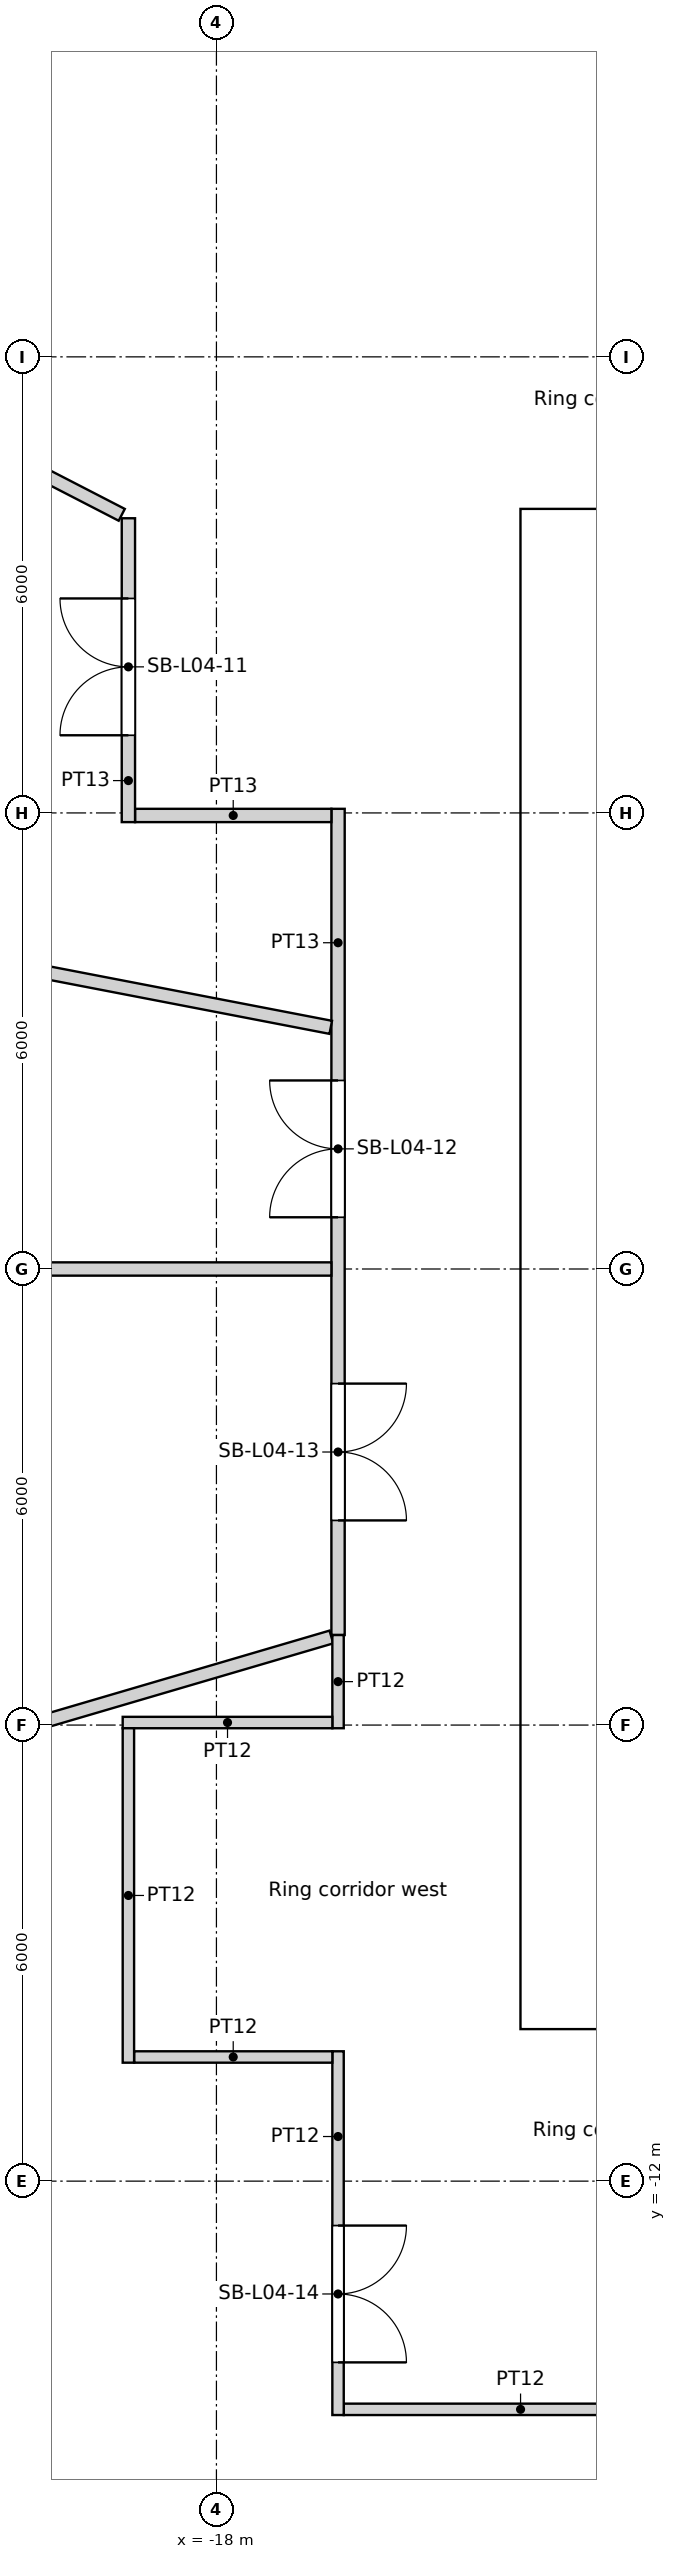
"""IFC4 building model, lengths in metres.
Left out: names, types, materials, properties, quantities, classifications, styles, units other than length and angle.
Written with IfcOpenShell. Run it as: python <this file> out.ifc"""

import sys

from ifc_helpers import new_model, si_unit, direction, frame, frame_2d, origin, origin_2d, place, context, subcontext, project, spatial, rectangle, circle, extrude, element, fill, save


model = new_model("IFC4")
c1 = context("Model", 3, precision=1e-05, world=origin(), true_north=direction((0.0, 1.0)))
c2 = subcontext(c1, "Body", "Model", "MODEL_VIEW")
j1 = project(units=[si_unit("LENGTHUNIT", "METRE"), si_unit("PLANEANGLEUNIT", "RADIAN")], contexts=[c1])
p1 = place(None, origin())
s1 = spatial("IfcSite", under=j1, at=p1, CompositionType="ELEMENT")
p2 = place(p1, origin())
s2 = spatial("IfcBuilding", under=s1, at=p2, CompositionType="ELEMENT")
p3 = place(p2, frame((0.0, 0.0, 23.4)))
s3 = spatial("IfcBuildingStorey", under=s2, at=p3, CompositionType="ELEMENT", Elevation=23.4)
for number, where, z_axis, x_axis in (
    (1, (-20.509, 13.489, 0.0), (0.0, 0.0, 1.0), (1.0, 0.0, 0.0)),
    (2, (-20.509, -13.489, 0.0), (0.0, 0.0, 1.0), (1.0, 0.0, 0.0)),
):
    element("IfcColumn", number, at=place(p3, frame(where, z_axis=z_axis, x_axis=x_axis)), inside=s3, PredefinedType="COLUMN", context=c2, shape_type="SweptSolid", body=[
        extrude(circle(Radius=0.75, at=origin_2d()), origin(), (0.0, 0.0, 1.0), 4.8),
    ])
for number, where, z_axis, x_axis in (
    (3, (-13.798, 12.802, 0.0), (0.0, 0.0, 1.0), (1.0, 0.0, 0.0)),
    (4, (-16.958, 8.167, 0.0), (0.0, 0.0, 1.0), (1.0, 0.0, 0.0)),
    (5, (-18.612, 2.805, 0.0), (0.0, 0.0, 1.0), (1.0, 0.0, 0.0)),
    (6, (-18.612, -2.805, 0.0), (0.0, 0.0, 1.0), (1.0, 0.0, 0.0)),
    (7, (-16.958, -8.167, 0.0), (0.0, 0.0, 1.0), (1.0, 0.0, 0.0)),
    (8, (-13.798, -12.802, 0.0), (0.0, 0.0, 1.0), (1.0, 0.0, 0.0)),
):
    element("IfcColumn", number, at=place(p3, frame(where, z_axis=z_axis, x_axis=x_axis)), inside=s3, PredefinedType="COLUMN", context=c2, shape_type="SweptSolid", body=[
        extrude(circle(Radius=0.8, at=origin_2d()), origin(), (0.0, 0.0, 1.0), 4.8),
    ])
p4 = place(p3, frame((-14.0, -9.4, 0.0), z_axis=(0.0, 0.0, 1.0), x_axis=(1.0, 0.0, 0.0)))
e9 = element("IfcWall", 9, at=p4, inside=s3, PredefinedType="SOLIDWALL", context=c2, shape_type="SweptSolid", body=[
    extrude(rectangle(XDim=28.0, YDim=1.2, at=frame_2d((14.0, 0.0))), origin(), (0.0, 0.0, 1.0), 4.8),
])
p5 = place(p4, frame((14.9, 0.0, 0.0)))
e10 = element("IfcOpeningElement", 10, at=p5, cuts=e9, PredefinedType="OPENING", context=c2, shape_type="SweptSolid", body=[
    extrude(rectangle(XDim=1.0, YDim=2.1, at=frame_2d((0.5, 1.05))), frame((0.0, 0.6, 0.0), z_axis=(0.0, -1.0, 0.0), x_axis=(1.0, 0.0, 0.0)), (0.0, 0.0, 1.0), 1.2),
])
p6 = place(p4, frame((9.8, 0.0, 0.0)))
e11 = element("IfcOpeningElement", 11, at=p6, cuts=e9, PredefinedType="OPENING", context=c2, shape_type="SweptSolid", body=[
    extrude(rectangle(XDim=1.8, YDim=2.1, at=frame_2d((0.9, 1.05))), frame((0.0, 0.6, 0.0), z_axis=(0.0, -1.0, 0.0), x_axis=(1.0, 0.0, 0.0)), (0.0, 0.0, 1.0), 1.2),
])
p7 = place(p4, frame((16.4, 0.0, 0.0)))
e12 = element("IfcOpeningElement", 12, at=p7, cuts=e9, PredefinedType="OPENING", context=c2, shape_type="SweptSolid", body=[
    extrude(rectangle(XDim=1.8, YDim=2.1, at=frame_2d((0.9, 1.05))), frame((0.0, 0.6, 0.0), z_axis=(0.0, -1.0, 0.0), x_axis=(1.0, 0.0, 0.0)), (0.0, 0.0, 1.0), 1.2),
])
p8 = place(p3, frame((-14.0, 9.4, 0.0), z_axis=(0.0, 0.0, 1.0), x_axis=(1.0, 0.0, 0.0)))
e13 = element("IfcWall", 13, at=p8, inside=s3, PredefinedType="SOLIDWALL", context=c2, shape_type="SweptSolid", body=[
    extrude(rectangle(XDim=28.0, YDim=1.2, at=frame_2d((14.0, 0.0))), origin(), (0.0, 0.0, 1.0), 4.8),
])
p9 = place(p8, frame((9.8, 0.0, 0.0)))
e14 = element("IfcOpeningElement", 14, at=p9, cuts=e13, PredefinedType="OPENING", context=c2, shape_type="SweptSolid", body=[
    extrude(rectangle(XDim=1.8, YDim=2.1, at=frame_2d((0.9, 1.05))), frame((0.0, 0.6, 0.0), z_axis=(0.0, -1.0, 0.0), x_axis=(1.0, 0.0, 0.0)), (0.0, 0.0, 1.0), 1.2),
])
p10 = place(p3, frame((-13.4, -8.8, 0.0), z_axis=(0.0, 0.0, 1.0), x_axis=(0.0, 1.0, 0.0)))
e15 = element("IfcWall", 15, at=p10, inside=s3, PredefinedType="SOLIDWALL", context=c2, shape_type="SweptSolid", body=[
    extrude(rectangle(XDim=17.6, YDim=1.2, at=frame_2d((8.8, 0.0))), origin(), (0.0, 0.0, 1.0), 4.8),
])
p11 = place(p10, frame((5.2, 0.0, 0.0)))
e16 = element("IfcOpeningElement", 16, at=p11, cuts=e15, PredefinedType="OPENING", context=c2, shape_type="SweptSolid", body=[
    extrude(rectangle(XDim=1.0, YDim=2.1, at=frame_2d((0.5, 1.05))), frame((0.0, 0.6, 0.0), z_axis=(0.0, -1.0, 0.0), x_axis=(1.0, 0.0, 0.0)), (0.0, 0.0, 1.0), 1.2),
])
p12 = place(p10, frame((11.4, 0.0, 0.0)))
e17 = element("IfcOpeningElement", 17, at=p12, cuts=e15, PredefinedType="OPENING", context=c2, shape_type="SweptSolid", body=[
    extrude(rectangle(XDim=1.0, YDim=2.1, at=frame_2d((0.5, 1.05))), frame((0.0, 0.6, 0.0), z_axis=(0.0, -1.0, 0.0), x_axis=(1.0, 0.0, 0.0)), (0.0, 0.0, 1.0), 1.2),
])
p13 = place(p3, frame((-31.224, 0.0, 0.0), z_axis=(0.0, 0.0, 1.0), x_axis=(1.0, 0.0, 0.0)))
e18 = element("IfcWall", 18, at=p13, inside=s3, PredefinedType="PARTITIONING", context=c2, shape_type="SweptSolid", body=[
    extrude(rectangle(XDim=14.737, YDim=0.175, at=frame_2d((7.368, 0.0))), origin(), (0.0, 0.0, 1.0), 3.75),
])
p14 = place(p3, frame((-30.66, 5.909, 0.0), z_axis=(0.0, 0.0, 1.0), x_axis=(0.981927651436, -0.189256670545, 0.0)))
e19 = element("IfcWall", 19, at=p14, inside=s3, PredefinedType="PARTITIONING", context=c2, shape_type="SweptSolid", body=[
    extrude(rectangle(XDim=14.425, YDim=0.175, at=frame_2d((7.212, 0.0))), origin(), (0.0, 0.0, 1.0), 3.75),
])
p15 = place(p3, frame((-29.959, -8.797, 0.0), z_axis=(0.0, 0.0, 1.0), x_axis=(0.959495810273, 0.281722895889, 0.0)))
e20 = element("IfcWall", 20, at=p15, inside=s3, PredefinedType="PARTITIONING", context=c2, shape_type="SweptSolid", body=[
    extrude(rectangle(XDim=14.041, YDim=0.175, at=frame_2d((7.02, 0.0))), origin(), (0.0, 0.0, 1.0), 3.75),
])
p16 = place(p3, frame((-27.753, 14.308, 0.0), z_axis=(0.0, 0.0, 1.0), x_axis=(0.888834171956, -0.458228998169, 0.0)))
e21 = element("IfcWall", 21, at=p16, inside=s3, PredefinedType="PARTITIONING", context=c2, shape_type="SweptSolid", body=[
    extrude(rectangle(XDim=9.572, YDim=0.175, at=frame_2d((4.786, 0.0))), origin(), (0.0, 0.0, 1.0), 3.75),
])
p17 = place(p3, frame((-19.083, -10.367, 0.0), z_axis=(0.0, 0.0, 1.0), x_axis=(1.0, 0.0, 0.0)))
e22 = element("IfcWall", 22, at=p17, inside=s3, PredefinedType="PARTITIONING", context=c2, shape_type="SweptSolid", body=[
    extrude(rectangle(XDim=2.608, YDim=0.15, at=frame_2d((1.304, 0.0))), origin(), (0.0, 0.0, 1.0), 3.75),
])
p18 = place(p3, frame((-19.158, -6.042, 0.0), z_axis=(0.0, 0.0, 1.0), x_axis=(0.0, -1.0, 0.0)))
e23 = element("IfcWall", 23, at=p18, inside=s3, PredefinedType="PARTITIONING", context=c2, shape_type="SweptSolid", body=[
    extrude(rectangle(XDim=4.4, YDim=0.15, at=frame_2d((2.2, 0.0))), origin(), (0.0, 0.0, 1.0), 3.75),
])
p19 = place(p3, frame((-19.071, 5.967, 0.0), z_axis=(0.0, 0.0, 1.0), x_axis=(1.0, 0.0, 0.0)))
e24 = element("IfcWall", 24, at=p19, inside=s3, PredefinedType="PARTITIONING", context=c2, shape_type="SweptSolid", body=[
    extrude(rectangle(XDim=2.583, YDim=0.175, at=frame_2d((1.292, 0.0))), origin(), (0.0, 0.0, 1.0), 3.75),
])
p20 = place(p3, frame((-19.158, 5.879, 0.0), z_axis=(0.0, 0.0, 1.0), x_axis=(0.0, 1.0, 0.0)))
e25 = element("IfcWall", 25, at=p20, inside=s3, PredefinedType="PARTITIONING", context=c2, shape_type="SweptSolid", body=[
    extrude(rectangle(XDim=3.998, YDim=0.175, at=frame_2d((1.999, 0.0))), origin(), (0.0, 0.0, 1.0), 3.75),
])
p21 = place(p20, frame((1.143, 0.0, 0.0)))
e26 = element("IfcOpeningElement", 26, at=p21, cuts=e25, PredefinedType="OPENING", context=c2, shape_type="SweptSolid", body=[
    extrude(rectangle(XDim=1.8, YDim=2.4, at=frame_2d((0.9, 1.2))), frame((0.0, 0.087, 0.0), z_axis=(0.0, -1.0, 0.0), x_axis=(1.0, 0.0, 0.0)), (0.0, 0.0, 1.0), 0.175),
])
p22 = place(p3, frame((-16.325, -15.002, 0.0), z_axis=(0.0, 0.0, 1.0), x_axis=(1.0, 0.0, 0.0)))
e27 = element("IfcWall", 27, at=p22, inside=s3, PredefinedType="PARTITIONING", context=c2, shape_type="SweptSolid", body=[
    extrude(rectangle(XDim=4.652, YDim=0.15, at=frame_2d((2.326, 0.0))), origin(), (0.0, 0.0, 1.0), 3.75),
])
p23 = place(p3, frame((-16.4, -15.077, 0.0), z_axis=(0.0, 0.0, 1.0), x_axis=(0.0, 1.0, 0.0)))
e28 = element("IfcWall", 28, at=p23, inside=s3, PredefinedType="PARTITIONING", context=c2, shape_type="SweptSolid", body=[
    extrude(rectangle(XDim=4.786, YDim=0.15, at=frame_2d((2.393, 0.0))), origin(), (0.0, 0.0, 1.0), 3.75),
])
p24 = place(p23, frame((0.693, 0.0, 0.0)))
e29 = element("IfcOpeningElement", 29, at=p24, cuts=e28, PredefinedType="OPENING", context=c2, shape_type="SweptSolid", body=[
    extrude(rectangle(XDim=1.8, YDim=2.4, at=frame_2d((0.9, 1.2))), frame((0.0, 0.075, 0.0), z_axis=(0.0, -1.0, 0.0), x_axis=(1.0, 0.0, 0.0)), (0.0, 0.0, 1.0), 0.15),
])
p25 = place(p3, frame((-16.475, -5.967, 0.0), z_axis=(0.0, 0.0, 1.0), x_axis=(-1.0, 0.0, 0.0)))
e30 = element("IfcWall", 30, at=p25, inside=s3, PredefinedType="PARTITIONING", context=c2, shape_type="SweptSolid", body=[
    extrude(rectangle(XDim=2.758, YDim=0.15, at=frame_2d((1.379, 0.0))), origin(), (0.0, 0.0, 1.0), 3.75),
])
p26 = place(p3, frame((-16.4, -4.815, 0.0), z_axis=(0.0, 0.0, 1.0), x_axis=(0.0, -1.0, 0.0)))
e31 = element("IfcWall", 31, at=p26, inside=s3, PredefinedType="PARTITIONING", context=c2, shape_type="SweptSolid", body=[
    extrude(rectangle(XDim=1.226, YDim=0.15, at=frame_2d((0.613, 0.0))), origin(), (0.0, 0.0, 1.0), 3.75),
])
p27 = place(p3, frame((-16.4, -4.815, 0.0), z_axis=(0.0, 0.0, 1.0), x_axis=(0.0, 1.0, 0.0)))
e32 = element("IfcWall", 32, at=p27, inside=s3, PredefinedType="PARTITIONING", context=c2, shape_type="SweptSolid", body=[
    extrude(rectangle(XDim=10.87, YDim=0.175, at=frame_2d((5.435, 0.0))), origin(), (0.0, 0.0, 1.0), 3.75),
])
p28 = place(p27, frame((5.496, 0.0, 0.0)))
e33 = element("IfcOpeningElement", 33, at=p28, cuts=e32, PredefinedType="OPENING", context=c2, shape_type="SweptSolid", body=[
    extrude(rectangle(XDim=1.8, YDim=2.4, at=frame_2d((0.9, 1.2))), frame((0.0, 0.087, 0.0), z_axis=(0.0, -1.0, 0.0), x_axis=(1.0, 0.0, 0.0)), (0.0, 0.0, 1.0), 0.175),
])
p29 = place(p27, frame((1.508, 0.0, 0.0)))
e34 = element("IfcOpeningElement", 34, at=p29, cuts=e32, PredefinedType="OPENING", context=c2, shape_type="SweptSolid", body=[
    extrude(rectangle(XDim=1.8, YDim=2.4, at=frame_2d((0.9, 1.2))), frame((0.0, 0.087, 0.0), z_axis=(0.0, -1.0, 0.0), x_axis=(1.0, 0.0, 0.0)), (0.0, 0.0, 1.0), 0.175),
])
p30 = place(p3, frame((-13.159, -22.793, 0.0), z_axis=(0.0, 0.0, 1.0), x_axis=(0.500009225661, 0.866020077281, 0.0)))
e35 = element("IfcWall", 35, at=p30, inside=s3, PredefinedType="PARTITIONING", context=c2, shape_type="SweptSolid", body=[
    extrude(rectangle(XDim=11.914, YDim=0.15, at=frame_2d((5.957, 0.0))), origin(), (0.0, 0.0, 1.0), 3.75),
])
p31 = place(p11, origin())
e36 = element("IfcDoor", 36, at=p31, inside=s3, OperationType="DOUBLE_DOOR_SINGLE_SWING", PredefinedType="DOOR", context=c2, shape_type="SweptSolid", body=[
    extrude(rectangle(XDim=1.0, YDim=2.1, at=frame_2d((0.5, 1.05))), frame((0.0, 0.025, 0.0), z_axis=(0.0, -1.0, 0.0), x_axis=(1.0, 0.0, 0.0)), (0.0, 0.0, 1.0), 0.05),
])
fill(e16, e36)
p32 = place(p12, origin())
e37 = element("IfcDoor", 37, at=p32, inside=s3, OperationType="DOUBLE_DOOR_SINGLE_SWING", PredefinedType="DOOR", context=c2, shape_type="SweptSolid", body=[
    extrude(rectangle(XDim=1.0, YDim=2.1, at=frame_2d((0.5, 1.05))), frame((0.0, 0.025, 0.0), z_axis=(0.0, -1.0, 0.0), x_axis=(1.0, 0.0, 0.0)), (0.0, 0.0, 1.0), 0.05),
])
fill(e17, e37)
p33 = place(p21, origin())
e38 = element("IfcDoor", 38, at=p33, inside=s3, OperationType="DOUBLE_DOOR_SINGLE_SWING", PredefinedType="DOOR", context=c2, shape_type="SweptSolid", body=[
    extrude(rectangle(XDim=1.8, YDim=2.4, at=frame_2d((0.9, 1.2))), frame((0.0, 0.025, 0.0), z_axis=(0.0, -1.0, 0.0), x_axis=(1.0, 0.0, 0.0)), (0.0, 0.0, 1.0), 0.05),
])
fill(e26, e38)
p34 = place(p28, origin())
e39 = element("IfcDoor", 39, at=p34, inside=s3, OperationType="DOUBLE_DOOR_SINGLE_SWING", PredefinedType="DOOR", context=c2, shape_type="SweptSolid", body=[
    extrude(rectangle(XDim=1.8, YDim=2.4, at=frame_2d((0.9, 1.2))), frame((0.0, 0.025, 0.0), z_axis=(0.0, -1.0, 0.0), x_axis=(1.0, 0.0, 0.0)), (0.0, 0.0, 1.0), 0.05),
])
fill(e33, e39)
p35 = place(p29, origin())
e40 = element("IfcDoor", 40, at=p35, inside=s3, OperationType="DOUBLE_DOOR_SINGLE_SWING", PredefinedType="DOOR", context=c2, shape_type="SweptSolid", body=[
    extrude(rectangle(XDim=1.8, YDim=2.4, at=frame_2d((0.9, 1.2))), frame((0.0, 0.025, 0.0), z_axis=(0.0, -1.0, 0.0), x_axis=(1.0, 0.0, 0.0)), (0.0, 0.0, 1.0), 0.05),
])
fill(e34, e40)
p36 = place(p24, origin())
e41 = element("IfcDoor", 41, at=p36, inside=s3, OperationType="DOUBLE_DOOR_SINGLE_SWING", PredefinedType="DOOR", context=c2, shape_type="SweptSolid", body=[
    extrude(rectangle(XDim=1.8, YDim=2.4, at=frame_2d((0.9, 1.2))), frame((0.0, 0.025, 0.0), z_axis=(0.0, -1.0, 0.0), x_axis=(1.0, 0.0, 0.0)), (0.0, 0.0, 1.0), 0.05),
])
fill(e29, e41)
save(model, sys.argv[1])
